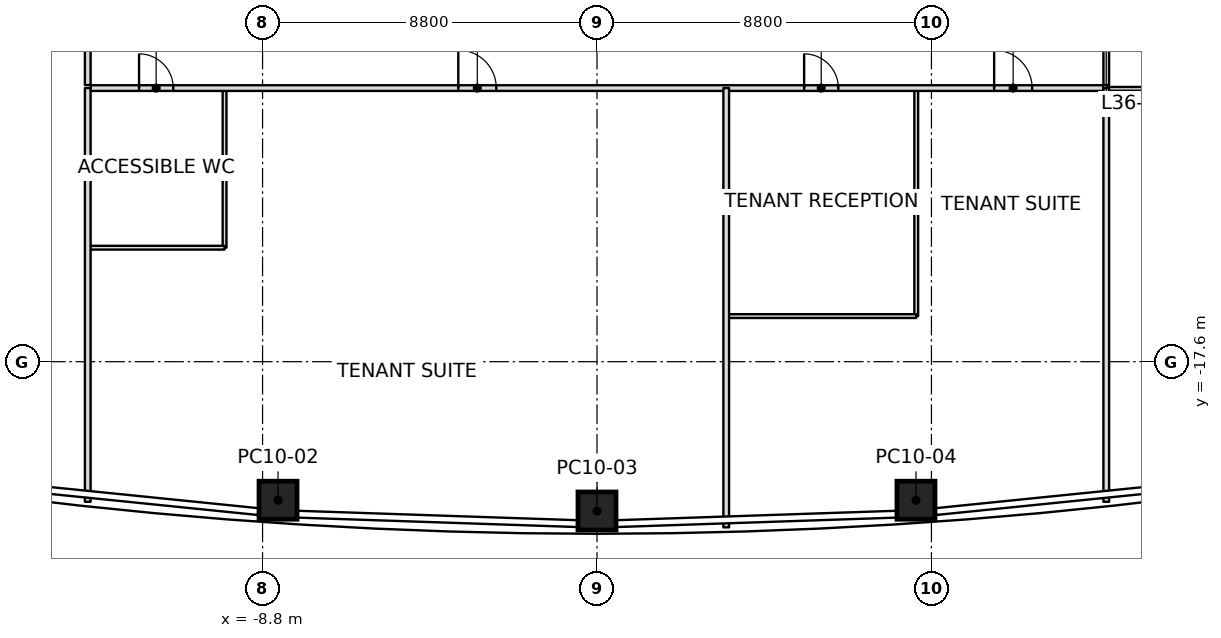
"""IFC4 building model, lengths in metres.
Left out: names, types, materials, properties, quantities, classifications, styles, units other than length and angle.
Written with IfcOpenShell. Run it as: python <this file> out.ifc"""

import sys

from ifc_helpers import new_model, si_unit, direction, frame, frame_2d, origin, origin_2d, place, context, subcontext, project, spatial, rectangle, extrude, element, fill, save


model = new_model("IFC4")
c1 = context("Model", 3, precision=1e-05, world=origin(), true_north=direction((0.0, 1.0)))
c2 = subcontext(c1, "Body", "Model", "MODEL_VIEW")
j1 = project(units=[si_unit("LENGTHUNIT", "METRE"), si_unit("PLANEANGLEUNIT", "RADIAN")], contexts=[c1])
p1 = place(None, origin())
s1 = spatial("IfcSite", under=j1, at=p1, CompositionType="ELEMENT")
p2 = place(p1, origin())
s2 = spatial("IfcBuilding", under=s1, at=p2, CompositionType="ELEMENT")
p3 = place(p2, frame((0.0, 0.0, 165.8)))
s3 = spatial("IfcBuildingStorey", under=s2, at=p3, CompositionType="ELEMENT", Elevation=165.8)
p4 = place(p3, frame((-8.393, -21.246, 0.0), z_axis=(0.008788174922, 0.01116830563, 0.999899013366), x_axis=(-0.997691697618, 0.067431644192, 0.008015601414)))
e1 = element("IfcColumn", 1, at=p4, inside=s3, PredefinedType="COLUMN", context=c2, shape_type="SweptSolid", body=[
    extrude(rectangle(XDim=1.0, YDim=1.0, at=origin_2d()), origin(), (0.0, 0.0, 1.0), 4.0),
])
p5 = place(p3, frame((0.0, -21.529, 0.0), z_axis=(0.0, 0.01141283087, 0.999934871525), x_axis=(1.0, 0.0, 0.0)))
e2 = element("IfcColumn", 2, at=p5, inside=s3, PredefinedType="COLUMN", context=c2, shape_type="SweptSolid", body=[
    extrude(rectangle(XDim=1.0, YDim=1.0, at=origin_2d()), origin(), (0.0, 0.0, 1.0), 4.0),
])
p6 = place(p3, frame((8.393, -21.246, 0.0), z_axis=(-0.008788174922, 0.01116830563, 0.999899013366), x_axis=(0.997691697618, 0.067431644192, 0.008015601414)))
e3 = element("IfcColumn", 3, at=p6, inside=s3, PredefinedType="COLUMN", context=c2, shape_type="SweptSolid", body=[
    extrude(rectangle(XDim=1.0, YDim=1.0, at=origin_2d()), origin(), (0.0, 0.0, 1.0), 4.0),
])
p7 = place(p3, frame((-13.4, -10.4, 0.0), z_axis=(0.0, 0.0, 1.0), x_axis=(0.0, -1.0, 0.0)))
e4 = element("IfcWall", 4, at=p7, inside=s3, PredefinedType="PARTITIONING", context=c2, shape_type="SweptSolid", body=[
    extrude(rectangle(XDim=10.888, YDim=0.15, at=frame_2d((5.444, 0.0))), origin(), (0.0, 0.0, 1.0), 3.234),
])
p8 = place(p3, frame((3.4, -10.4, 0.0), z_axis=(0.0, 0.0, 1.0), x_axis=(0.0, -1.0, 0.0)))
e5 = element("IfcWall", 5, at=p8, inside=s3, PredefinedType="PARTITIONING", context=c2, shape_type="SweptSolid", body=[
    extrude(rectangle(XDim=11.56, YDim=0.15, at=frame_2d((5.78, 0.0))), origin(), (0.0, 0.0, 1.0), 3.234),
])
p9 = place(p3, frame((13.4, -10.4, 0.0), z_axis=(0.0, 0.0, 1.0), x_axis=(0.0, -1.0, 0.0)))
e6 = element("IfcWall", 6, at=p9, inside=s3, PredefinedType="PARTITIONING", context=c2, shape_type="SweptSolid", body=[
    extrude(rectangle(XDim=10.888, YDim=0.15, at=frame_2d((5.444, 0.0))), origin(), (0.0, 0.0, 1.0), 3.234),
])
p10 = place(p3, frame((-13.4, 10.32, 0.0), z_axis=(0.0, 0.0, 1.0), x_axis=(0.0, -1.0, 0.0)))
e7 = element("IfcWall", 7, at=p10, inside=s3, PredefinedType="PARTITIONING", context=c2, shape_type="SweptSolid", body=[
    extrude(rectangle(XDim=20.64, YDim=0.15, at=frame_2d((10.32, 0.0))), origin(), (0.0, 0.0, 1.0), 3.166),
])
p11 = place(p10, frame((1.57, 0.0, 0.0)))
e8 = element("IfcOpeningElement", 8, at=p11, cuts=e7, PredefinedType="OPENING", context=c2, shape_type="SweptSolid", body=[
    extrude(rectangle(XDim=0.9, YDim=2.1, at=frame_2d((0.45, 1.05))), frame((0.0, 0.075, 0.0), z_axis=(0.0, -1.0, 0.0), x_axis=(1.0, 0.0, 0.0)), (0.0, 0.0, 1.0), 0.15),
])
p12 = place(p10, frame((11.98, 0.0, 0.0)))
e9 = element("IfcOpeningElement", 9, at=p12, cuts=e7, PredefinedType="OPENING", context=c2, shape_type="SweptSolid", body=[
    extrude(rectangle(XDim=1.0, YDim=2.1, at=frame_2d((0.5, 1.05))), frame((0.0, 0.075, 0.0), z_axis=(0.0, -1.0, 0.0), x_axis=(1.0, 0.0, 0.0)), (0.0, 0.0, 1.0), 0.15),
])
p13 = place(p3, frame((-13.32, -10.4, 0.0), z_axis=(0.0, 0.0, 1.0), x_axis=(1.0, 0.0, 0.0)))
e10 = element("IfcWall", 10, at=p13, inside=s3, PredefinedType="PARTITIONING", context=c2, shape_type="SweptSolid", body=[
    extrude(rectangle(XDim=26.64, YDim=0.15, at=frame_2d((13.32, 0.0))), origin(), (0.0, 0.0, 1.0), 3.317),
])
p14 = place(p13, frame((1.27, 0.0, 0.0)))
e11 = element("IfcOpeningElement", 11, at=p14, cuts=e10, PredefinedType="OPENING", context=c2, shape_type="SweptSolid", body=[
    extrude(rectangle(XDim=0.9, YDim=2.1, at=frame_2d((0.45, 1.05))), frame((0.0, 0.075, 0.0), z_axis=(0.0, -1.0, 0.0), x_axis=(1.0, 0.0, 0.0)), (0.0, 0.0, 1.0), 0.15),
])
p15 = place(p13, frame((9.67, 0.0, 0.0)))
e12 = element("IfcOpeningElement", 12, at=p15, cuts=e10, PredefinedType="OPENING", context=c2, shape_type="SweptSolid", body=[
    extrude(rectangle(XDim=1.0, YDim=2.1, at=frame_2d((0.5, 1.05))), frame((0.0, 0.075, 0.0), z_axis=(0.0, -1.0, 0.0), x_axis=(1.0, 0.0, 0.0)), (0.0, 0.0, 1.0), 0.15),
])
p16 = place(p13, frame((18.77, 0.0, 0.0)))
e13 = element("IfcOpeningElement", 13, at=p16, cuts=e10, PredefinedType="OPENING", context=c2, shape_type="SweptSolid", body=[
    extrude(rectangle(XDim=0.9, YDim=2.1, at=frame_2d((0.45, 1.05))), frame((0.0, 0.075, 0.0), z_axis=(0.0, -1.0, 0.0), x_axis=(1.0, 0.0, 0.0)), (0.0, 0.0, 1.0), 0.15),
])
p17 = place(p13, frame((23.77, 0.0, 0.0)))
e14 = element("IfcOpeningElement", 14, at=p17, cuts=e10, PredefinedType="OPENING", context=c2, shape_type="SweptSolid", body=[
    extrude(rectangle(XDim=1.0, YDim=2.1, at=frame_2d((0.5, 1.05))), frame((0.0, 0.075, 0.0), z_axis=(0.0, -1.0, 0.0), x_axis=(1.0, 0.0, 0.0)), (0.0, 0.0, 1.0), 0.15),
])
p18 = place(p3, frame((13.4, -10.32, 0.0), z_axis=(0.0, 0.0, 1.0), x_axis=(0.0, 1.0, 0.0)))
e15 = element("IfcWall", 15, at=p18, inside=s3, PredefinedType="PARTITIONING", context=c2, shape_type="SweptSolid", body=[
    extrude(rectangle(XDim=20.64, YDim=0.15, at=frame_2d((10.32, 0.0))), origin(), (0.0, 0.0, 1.0), 3.166),
])
p19 = place(p18, frame((6.37, 0.0, 0.0)))
e16 = element("IfcOpeningElement", 16, at=p19, cuts=e15, PredefinedType="OPENING", context=c2, shape_type="SweptSolid", body=[
    extrude(rectangle(XDim=0.9, YDim=2.1, at=frame_2d((0.45, 1.05))), frame((0.0, 0.075, 0.0), z_axis=(0.0, -1.0, 0.0), x_axis=(1.0, 0.0, 0.0)), (0.0, 0.0, 1.0), 0.15),
])
p20 = place(p18, frame((14.37, 0.0, 0.0)))
e17 = element("IfcOpeningElement", 17, at=p20, cuts=e15, PredefinedType="OPENING", context=c2, shape_type="SweptSolid", body=[
    extrude(rectangle(XDim=1.0, YDim=2.1, at=frame_2d((0.5, 1.05))), frame((0.0, 0.075, 0.0), z_axis=(0.0, -1.0, 0.0), x_axis=(1.0, 0.0, 0.0)), (0.0, 0.0, 1.0), 0.15),
])
p21 = place(p18, frame((0.95, 0.0, 0.0)))
e18 = element("IfcOpeningElement", 18, at=p21, cuts=e15, PredefinedType="OPENING", context=c2, shape_type="SweptSolid", body=[
    extrude(rectangle(XDim=0.9, YDim=2.1, at=frame_2d((0.45, 1.05))), frame((0.0, 0.075, 0.0), z_axis=(0.0, -1.0, 0.0), x_axis=(1.0, 0.0, 0.0)), (0.0, 0.0, 1.0), 0.15),
])
p22 = place(p18, frame((3.36, 0.0, 0.0)))
e19 = element("IfcOpeningElement", 19, at=p22, cuts=e15, PredefinedType="OPENING", context=c2, shape_type="SweptSolid", body=[
    extrude(rectangle(XDim=1.0, YDim=2.1, at=frame_2d((0.5, 1.05))), frame((0.0, 0.075, 0.0), z_axis=(0.0, -1.0, 0.0), x_axis=(1.0, 0.0, 0.0)), (0.0, 0.0, 1.0), 0.15),
])
p23 = place(p3, frame((-9.8, -10.43, 0.0), z_axis=(0.0, 0.0, 1.0), x_axis=(0.0, -1.0, 0.0)))
e20 = element("IfcWall", 20, at=p23, inside=s3, PredefinedType="PARTITIONING", context=c2, shape_type="SweptSolid", body=[
    extrude(rectangle(XDim=4.17, YDim=0.1, at=frame_2d((2.085, 0.0))), origin(), (0.0, 0.0, 1.0), 3.45),
])
p24 = place(p3, frame((-9.8, -14.6, 0.0), z_axis=(0.0, 0.0, 1.0), x_axis=(-1.0, 0.0, 0.0)))
e21 = element("IfcWall", 21, at=p24, inside=s3, PredefinedType="PARTITIONING", context=c2, shape_type="SweptSolid", body=[
    extrude(rectangle(XDim=3.57, YDim=0.1, at=frame_2d((1.785, 0.0))), origin(), (0.0, 0.0, 1.0), 3.393),
])
p25 = place(p3, frame((8.4, -10.43, 0.0), z_axis=(0.0, 0.0, 1.0), x_axis=(0.0, -1.0, 0.0)))
e22 = element("IfcWall", 22, at=p25, inside=s3, PredefinedType="PARTITIONING", context=c2, shape_type="SweptSolid", body=[
    extrude(rectangle(XDim=5.97, YDim=0.1, at=frame_2d((2.985, 0.0))), origin(), (0.0, 0.0, 1.0), 3.45),
])
p26 = place(p3, frame((8.4, -16.4, 0.0), z_axis=(0.0, 0.0, 1.0), x_axis=(-1.0, 0.0, 0.0)))
e23 = element("IfcWall", 23, at=p26, inside=s3, PredefinedType="PARTITIONING", context=c2, shape_type="SweptSolid", body=[
    extrude(rectangle(XDim=4.97, YDim=0.1, at=frame_2d((2.485, 0.0))), origin(), (0.0, 0.0, 1.0), 3.317),
])
p27 = place(p3, frame((17.0, -10.42, 0.0), z_axis=(0.0, 0.0, 1.0), x_axis=(-1.0, 0.0, 0.0)))
e24 = element("IfcWall", 24, at=p27, inside=s3, PredefinedType="PARTITIONING", context=c2, shape_type="SweptSolid", body=[
    extrude(rectangle(XDim=3.57, YDim=0.1, at=frame_2d((1.785, 0.0))), origin(), (0.0, 0.0, 1.0), 3.166),
])
p28 = place(p14, origin())
e25 = element("IfcDoor", 25, at=p28, inside=s3, OperationType="SINGLE_SWING_RIGHT", PredefinedType="DOOR", context=c2, shape_type="SweptSolid", body=[
    extrude(rectangle(XDim=0.9, YDim=2.1, at=frame_2d((0.45, 1.05))), frame((0.0, 0.025, 0.0), z_axis=(0.0, -1.0, 0.0), x_axis=(1.0, 0.0, 0.0)), (0.0, 0.0, 1.0), 0.05),
])
fill(e11, e25)
p29 = place(p15, origin())
e26 = element("IfcDoor", 26, at=p29, inside=s3, OperationType="SINGLE_SWING_RIGHT", PredefinedType="DOOR", context=c2, shape_type="SweptSolid", body=[
    extrude(rectangle(XDim=1.0, YDim=2.1, at=frame_2d((0.5, 1.05))), frame((0.0, 0.025, 0.0), z_axis=(0.0, -1.0, 0.0), x_axis=(1.0, 0.0, 0.0)), (0.0, 0.0, 1.0), 0.05),
])
fill(e12, e26)
p30 = place(p16, origin())
e27 = element("IfcDoor", 27, at=p30, inside=s3, OperationType="SINGLE_SWING_RIGHT", PredefinedType="DOOR", context=c2, shape_type="SweptSolid", body=[
    extrude(rectangle(XDim=0.9, YDim=2.1, at=frame_2d((0.45, 1.05))), frame((0.0, 0.025, 0.0), z_axis=(0.0, -1.0, 0.0), x_axis=(1.0, 0.0, 0.0)), (0.0, 0.0, 1.0), 0.05),
])
fill(e13, e27)
p31 = place(p17, origin())
e28 = element("IfcDoor", 28, at=p31, inside=s3, OperationType="SINGLE_SWING_LEFT", PredefinedType="DOOR", context=c2, shape_type="SweptSolid", body=[
    extrude(rectangle(XDim=1.0, YDim=2.1, at=frame_2d((0.5, 1.05))), frame((0.0, 0.025, 0.0), z_axis=(0.0, -1.0, 0.0), x_axis=(1.0, 0.0, 0.0)), (0.0, 0.0, 1.0), 0.05),
])
fill(e14, e28)
save(model, sys.argv[1])
